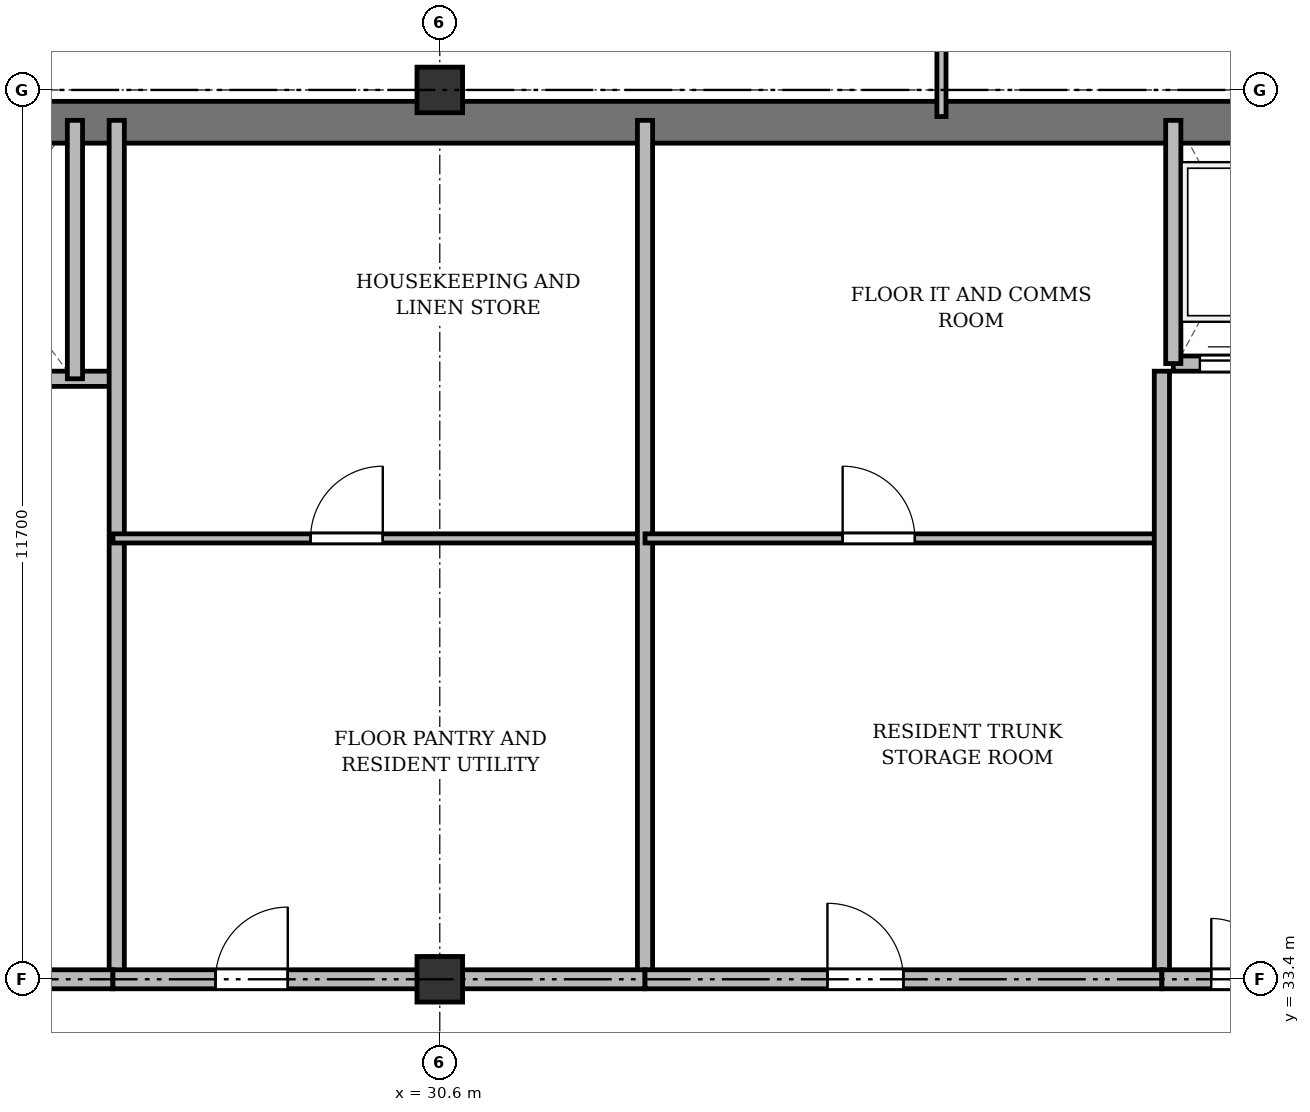
"""IFC4 building model, lengths in metres.
Left out: names, types, materials, properties, quantities, classifications, styles, units other than length and angle.
Written with IfcOpenShell. Run it as: python <this file> out.ifc"""

import sys

from ifc_helpers import new_model, si_unit, direction, frame, frame_2d, origin, origin_2d, place, context, subcontext, project, spatial, rectangle, extrude, source, transform, mapped, element, fill, save


model = new_model("IFC4")
c1 = context("Model", 3, precision=1e-05, world=origin(), true_north=direction((0.0, 1.0)))
c2 = subcontext(c1, "Body", "Model", "MODEL_VIEW")
j1 = project(units=[si_unit("LENGTHUNIT", "METRE"), si_unit("PLANEANGLEUNIT", "RADIAN")], contexts=[c1])
p1 = place(None, origin())
s1 = spatial("IfcSite", under=j1, at=p1, CompositionType="ELEMENT")
p2 = place(p1, origin())
s2 = spatial("IfcBuilding", under=s1, at=p2, CompositionType="ELEMENT")
p3 = place(p2, frame((0.0, 0.0, 277.5)))
s3 = spatial("IfcBuildingStorey", under=s2, at=p3, CompositionType="ELEMENT", Elevation=277.5)
m1 = source(origin(), c2, "Body", "SweptSolid", [
    extrude(rectangle(XDim=0.6, YDim=0.6, at=origin_2d()), origin(), (0.0, 0.0, 1.0), 3.6),
])
for number, where, z_axis, x_axis in (
    (1, (30.6, 33.4, 0.0), (0.0, 0.0, 1.0), (1.0, 0.0, 0.0)),
    (2, (30.6, 45.1, 0.0), (0.0, 0.0, 1.0), (1.0, 0.0, 0.0)),
):
    element("IfcColumn", number, at=place(p3, frame(where, z_axis=z_axis, x_axis=x_axis)), inside=s3, PredefinedType="COLUMN", context=c2, shape_type="MappedRepresentation", body=[
        mapped(m1, transform((0.0, 0.0, 0.0), x_axis=(1.0, 0.0, 0.0), y_axis=(0.0, 1.0, 0.0), z_axis=(0.0, 0.0, 1.0), scale=1.0)),
    ])
p4 = place(p3, frame((15.65, 44.675, 0.0), z_axis=(0.0, 0.0, 1.0), x_axis=(1.0, 0.0, 0.0)))
e3 = element("IfcWall", 3, at=p4, inside=s3, PredefinedType="SHEAR", context=c2, shape_type="SweptSolid", body=[
    extrude(rectangle(XDim=43.1, YDim=0.55, at=frame_2d((21.55, 0.0))), origin(), (0.0, 0.0, 1.0), 3.37),
])
p5 = place(p3, frame((19.55, 41.3, 0.0), z_axis=(0.0, 0.0, 1.0), x_axis=(1.0, 0.0, 0.0)))
e4 = element("IfcWall", 4, at=p5, inside=s3, PredefinedType="SOLIDWALL", context=c2, shape_type="SweptSolid", body=[
    extrude(rectangle(XDim=6.75, YDim=0.2, at=frame_2d((3.375, 0.0))), origin(), (0.0, 0.0, 1.0), 3.37),
])
p6 = place(p5, frame((1.7, 0.0, 0.0)))
e5 = element("IfcOpeningElement", 5, at=p6, cuts=e4, PredefinedType="OPENING", context=c2, shape_type="SweptSolid", body=[
    extrude(rectangle(XDim=1.1, YDim=2.15, at=frame_2d((0.55, 1.075))), frame((0.0, 0.11, 0.0), z_axis=(0.0, -1.0, 0.0), x_axis=(1.0, 0.0, 0.0)), (0.0, 0.0, 1.0), 0.22),
])
p7 = place(p5, frame((4.4, 0.0, 0.0)))
e6 = element("IfcOpeningElement", 6, at=p7, cuts=e4, PredefinedType="OPENING", context=c2, shape_type="SweptSolid", body=[
    extrude(rectangle(XDim=1.1, YDim=2.15, at=frame_2d((0.55, 1.075))), frame((0.0, 0.11, 0.0), z_axis=(0.0, -1.0, 0.0), x_axis=(1.0, 0.0, 0.0)), (0.0, 0.0, 1.0), 0.22),
])
p8 = place(p3, frame((25.8, 41.3, 0.0), z_axis=(0.0, 0.0, 1.0), x_axis=(0.0, 1.0, 0.0)))
e7 = element("IfcWall", 7, at=p8, inside=s3, PredefinedType="SOLIDWALL", context=c2, shape_type="SweptSolid", body=[
    extrude(rectangle(XDim=3.4, YDim=0.2, at=frame_2d((1.7, 0.0))), origin(), (0.0, 0.0, 1.0), 3.37),
])
p9 = place(p3, frame((26.35, 33.4, 0.0), z_axis=(0.0, 0.0, 1.0), x_axis=(0.0, 1.0, 0.0)))
e8 = element("IfcWall", 8, at=p9, inside=s3, PredefinedType="SOLIDWALL", context=c2, shape_type="SweptSolid", body=[
    extrude(rectangle(XDim=11.3, YDim=0.2, at=frame_2d((5.65, 0.0))), origin(), (0.0, 0.0, 1.0), 2.92),
])
p10 = place(p3, frame((19.5, 33.4, 0.0), z_axis=(0.0, 0.0, 1.0), x_axis=(1.0, 0.0, 0.0)))
e9 = element("IfcWall", 9, at=p10, inside=s3, PredefinedType="PARTITIONING", context=c2, shape_type="SweptSolid", body=[
    extrude(rectangle(XDim=6.8, YDim=0.25, at=frame_2d((3.4, 0.0))), origin(), (0.0, 0.0, 1.0), 2.92),
])
p11 = place(p10, frame((0.75, 0.0, 0.0)))
e10 = element("IfcOpeningElement", 10, at=p11, cuts=e9, PredefinedType="OPENING", context=c2, shape_type="SweptSolid", body=[
    extrude(rectangle(XDim=1.6, YDim=2.2, at=frame_2d((0.8, 1.1))), frame((0.0, 0.135, 0.0), z_axis=(0.0, -1.0, 0.0), x_axis=(1.0, 0.0, 0.0)), (0.0, 0.0, 1.0), 0.27),
])
p12 = place(p3, frame((26.3, 39.2, 0.0), z_axis=(0.0, 0.0, 1.0), x_axis=(1.0, 0.0, 0.0)))
e11 = element("IfcWall", 11, at=p12, inside=s3, PredefinedType="PARTITIONING", context=c2, shape_type="SweptSolid", body=[
    extrude(rectangle(XDim=7.0, YDim=0.12, at=frame_2d((3.5, 0.0))), origin(), (0.0, 0.0, 1.0), 2.87),
])
p13 = place(p12, frame((2.6, 0.0, 0.0)))
e12 = element("IfcOpeningElement", 12, at=p13, cuts=e11, PredefinedType="OPENING", context=c2, shape_type="SweptSolid", body=[
    extrude(rectangle(XDim=0.95, YDim=2.15, at=frame_2d((0.475, 1.075))), frame((0.0, 0.07, 0.0), z_axis=(0.0, -1.0, 0.0), x_axis=(1.0, 0.0, 0.0)), (0.0, 0.0, 1.0), 0.14),
])
p14 = place(p3, frame((33.3, 33.4, 0.0), z_axis=(0.0, 0.0, 1.0), x_axis=(0.0, 1.0, 0.0)))
e13 = element("IfcWall", 13, at=p14, inside=s3, PredefinedType="SOLIDWALL", context=c2, shape_type="SweptSolid", body=[
    extrude(rectangle(XDim=11.3, YDim=0.2, at=frame_2d((5.65, 0.0))), origin(), (0.0, 0.0, 1.0), 2.92),
])
p15 = place(p3, frame((33.3, 39.2, 0.0), z_axis=(0.0, 0.0, 1.0), x_axis=(1.0, 0.0, 0.0)))
e14 = element("IfcWall", 14, at=p15, inside=s3, PredefinedType="PARTITIONING", context=c2, shape_type="SweptSolid", body=[
    extrude(rectangle(XDim=6.8, YDim=0.12, at=frame_2d((3.4, 0.0))), origin(), (0.0, 0.0, 1.0), 3.37),
])
p16 = place(p15, frame((2.6, 0.0, 0.0)))
e15 = element("IfcOpeningElement", 15, at=p16, cuts=e14, PredefinedType="OPENING", context=c2, shape_type="SweptSolid", body=[
    extrude(rectangle(XDim=0.95, YDim=2.15, at=frame_2d((0.475, 1.075))), frame((0.0, 0.07, 0.0), z_axis=(0.0, -1.0, 0.0), x_axis=(1.0, 0.0, 0.0)), (0.0, 0.0, 1.0), 0.14),
])
p17 = place(p3, frame((40.1, 33.4, 0.0), z_axis=(0.0, 0.0, 1.0), x_axis=(0.0, 1.0, 0.0)))
e16 = element("IfcWall", 16, at=p17, inside=s3, PredefinedType="SOLIDWALL", context=c2, shape_type="SweptSolid", body=[
    extrude(rectangle(XDim=8.0, YDim=0.2, at=frame_2d((4.0, 0.0))), origin(), (0.0, 0.0, 1.0), 2.92),
])
p18 = place(p3, frame((40.25, 41.5, 0.0), z_axis=(0.0, 0.0, 1.0), x_axis=(1.0, 0.0, 0.0)))
e17 = element("IfcWall", 17, at=p18, inside=s3, PredefinedType="SOLIDWALL", context=c2, shape_type="SweptSolid", body=[
    extrude(rectangle(XDim=6.9, YDim=0.2, at=frame_2d((3.45, 0.0))), origin(), (0.0, 0.0, 1.0), 3.37),
])
p19 = place(p18, frame((0.35, 0.0, 0.0)))
e18 = element("IfcOpeningElement", 18, at=p19, cuts=e17, PredefinedType="OPENING", context=c2, shape_type="SweptSolid", body=[
    extrude(rectangle(XDim=1.05, YDim=2.15, at=frame_2d((0.525, 1.075))), frame((0.0, 0.11, 0.0), z_axis=(0.0, -1.0, 0.0), x_axis=(1.0, 0.0, 0.0)), (0.0, 0.0, 1.0), 0.22),
])
p20 = place(p18, frame((2.05, 0.0, 0.0)))
e19 = element("IfcOpeningElement", 19, at=p20, cuts=e17, PredefinedType="OPENING", context=c2, shape_type="SweptSolid", body=[
    extrude(rectangle(XDim=1.05, YDim=2.15, at=frame_2d((0.525, 1.075))), frame((0.0, 0.11, 0.0), z_axis=(0.0, -1.0, 0.0), x_axis=(1.0, 0.0, 0.0)), (0.0, 0.0, 1.0), 0.22),
])
p21 = place(p18, frame((3.75, 0.0, 0.0)))
e20 = element("IfcOpeningElement", 20, at=p21, cuts=e17, PredefinedType="OPENING", context=c2, shape_type="SweptSolid", body=[
    extrude(rectangle(XDim=1.05, YDim=2.15, at=frame_2d((0.525, 1.075))), frame((0.0, 0.11, 0.0), z_axis=(0.0, -1.0, 0.0), x_axis=(1.0, 0.0, 0.0)), (0.0, 0.0, 1.0), 0.22),
])
p22 = place(p18, frame((5.45, 0.0, 0.0)))
e21 = element("IfcOpeningElement", 21, at=p22, cuts=e17, PredefinedType="OPENING", context=c2, shape_type="SweptSolid", body=[
    extrude(rectangle(XDim=1.05, YDim=2.15, at=frame_2d((0.525, 1.075))), frame((0.0, 0.11, 0.0), z_axis=(0.0, -1.0, 0.0), x_axis=(1.0, 0.0, 0.0)), (0.0, 0.0, 1.0), 0.22),
])
p23 = place(p3, frame((40.25, 41.5, 0.0), z_axis=(0.0, 0.0, 1.0), x_axis=(0.0, 1.0, 0.0)))
e22 = element("IfcWall", 22, at=p23, inside=s3, PredefinedType="SOLIDWALL", context=c2, shape_type="SweptSolid", body=[
    extrude(rectangle(XDim=3.2, YDim=0.2, at=frame_2d((1.6, 0.0))), origin(), (0.0, 0.0, 1.0), 3.37),
])
p24 = place(p3, frame((26.3, 33.4, 0.0), z_axis=(0.0, 0.0, 1.0), x_axis=(1.0, 0.0, 0.0)))
e23 = element("IfcWall", 23, at=p24, inside=s3, PredefinedType="PARTITIONING", context=c2, shape_type="SweptSolid", body=[
    extrude(rectangle(XDim=7.0, YDim=0.25, at=frame_2d((3.5, 0.0))), origin(), (0.0, 0.0, 1.0), 2.92),
])
p25 = place(p24, frame((1.35, 0.0, 0.0)))
e24 = element("IfcOpeningElement", 24, at=p25, cuts=e23, PredefinedType="OPENING", context=c2, shape_type="SweptSolid", body=[
    extrude(rectangle(XDim=0.95, YDim=2.15, at=frame_2d((0.475, 1.075))), frame((0.0, 0.135, 0.0), z_axis=(0.0, -1.0, 0.0), x_axis=(1.0, 0.0, 0.0)), (0.0, 0.0, 1.0), 0.27),
])
p26 = place(p3, frame((33.3, 33.4, 0.0), z_axis=(0.0, 0.0, 1.0), x_axis=(1.0, 0.0, 0.0)))
e25 = element("IfcWall", 25, at=p26, inside=s3, PredefinedType="PARTITIONING", context=c2, shape_type="SweptSolid", body=[
    extrude(rectangle(XDim=6.8, YDim=0.25, at=frame_2d((3.4, 0.0))), origin(), (0.0, 0.0, 1.0), 2.92),
])
p27 = place(p26, frame((2.4, 0.0, 0.0)))
e26 = element("IfcOpeningElement", 26, at=p27, cuts=e25, PredefinedType="OPENING", context=c2, shape_type="SweptSolid", body=[
    extrude(rectangle(XDim=1.0, YDim=2.15, at=frame_2d((0.5, 1.075))), frame((0.0, 0.135, 0.0), z_axis=(0.0, -1.0, 0.0), x_axis=(1.0, 0.0, 0.0)), (0.0, 0.0, 1.0), 0.27),
])
p28 = place(p3, frame((40.1, 33.4, 0.0), z_axis=(0.0, 0.0, 1.0), x_axis=(1.0, 0.0, 0.0)))
e27 = element("IfcWall", 27, at=p28, inside=s3, PredefinedType="PARTITIONING", context=c2, shape_type="SweptSolid", body=[
    extrude(rectangle(XDim=7.05, YDim=0.25, at=frame_2d((3.525, 0.0))), origin(), (0.0, 0.0, 1.0), 2.92),
])
p29 = place(p28, frame((0.65, 0.0, 0.0)))
e28 = element("IfcOpeningElement", 28, at=p29, cuts=e27, PredefinedType="OPENING", context=c2, shape_type="SweptSolid", body=[
    extrude(rectangle(XDim=1.6, YDim=2.2, at=frame_2d((0.8, 1.1))), frame((0.0, 0.135, 0.0), z_axis=(0.0, -1.0, 0.0), x_axis=(1.0, 0.0, 0.0)), (0.0, 0.0, 1.0), 0.27),
])
p30 = place(p3, frame((37.2, 44.75, 0.0), z_axis=(0.0, 0.0, 1.0), x_axis=(0.0, 1.0, 0.0)))
e29 = element("IfcWall", 29, at=p30, inside=s3, PredefinedType="PARTITIONING", context=c2, shape_type="SweptSolid", body=[
    extrude(rectangle(XDim=3.61, YDim=0.12, at=frame_2d((1.805, 0.0))), origin(), (0.0, 0.0, 1.0), 2.92),
])
p31 = place(p30, frame((1.1, 0.0, 0.0)))
e30 = element("IfcOpeningElement", 30, at=p31, cuts=e29, PredefinedType="OPENING", context=c2, shape_type="SweptSolid", body=[
    extrude(rectangle(XDim=0.95, YDim=2.15, at=frame_2d((0.475, 1.075))), frame((0.0, 0.07, 0.0), z_axis=(0.0, -1.0, 0.0), x_axis=(1.0, 0.0, 0.0)), (0.0, 0.0, 1.0), 0.14),
])
m2 = source(origin(), c2, "Body", "SweptSolid", [
    extrude(rectangle(XDim=0.95, YDim=2.15, at=frame_2d((0.475, 1.075))), frame((0.0, 0.025, 0.0), z_axis=(0.0, -1.0, 0.0), x_axis=(1.0, 0.0, 0.0)), (0.0, 0.0, 1.0), 0.05),
])
p32 = place(p13, origin())
e31 = element("IfcDoor", 31, at=p32, inside=s3, OperationType="SINGLE_SWING_RIGHT", PredefinedType="DOOR", context=c2, shape_type="MappedRepresentation", body=[
    mapped(m2, transform((0.0, 0.0, 0.0), x_axis=(1.0, 0.0, 0.0), y_axis=(0.0, 1.0, 0.0), z_axis=(0.0, 0.0, 1.0), scale=1.0)),
])
fill(e12, e31)
p33 = place(p16, origin())
e32 = element("IfcDoor", 32, at=p33, inside=s3, OperationType="SINGLE_SWING_LEFT", PredefinedType="DOOR", context=c2, shape_type="MappedRepresentation", body=[
    mapped(m2, transform((0.0, 0.0, 0.0), x_axis=(1.0, 0.0, 0.0), y_axis=(0.0, 1.0, 0.0), z_axis=(0.0, 0.0, 1.0), scale=1.0)),
])
fill(e15, e32)
m3 = source(origin(), c2, "Body", "SweptSolid", [
    extrude(rectangle(XDim=1.05, YDim=2.15, at=frame_2d((0.525, 1.075))), frame((0.0, 0.025, 0.0), z_axis=(0.0, -1.0, 0.0), x_axis=(1.0, 0.0, 0.0)), (0.0, 0.0, 1.0), 0.05),
])
p34 = place(p19, origin())
e33 = element("IfcDoor", 33, at=p34, inside=s3, OperationType="DOUBLE_DOOR_SLIDING", PredefinedType="DOOR", context=c2, shape_type="MappedRepresentation", body=[
    mapped(m3, transform((0.0, 0.0, 0.0), x_axis=(1.0, 0.0, 0.0), y_axis=(0.0, 1.0, 0.0), z_axis=(0.0, 0.0, 1.0), scale=1.0)),
])
fill(e18, e33)
p35 = place(p25, origin())
e34 = element("IfcDoor", 34, at=p35, inside=s3, OperationType="SINGLE_SWING_RIGHT", PredefinedType="DOOR", context=c2, shape_type="MappedRepresentation", body=[
    mapped(m2, transform((0.0, 0.0, 0.0), x_axis=(1.0, 0.0, 0.0), y_axis=(0.0, 1.0, 0.0), z_axis=(0.0, 0.0, 1.0), scale=1.0)),
])
fill(e24, e34)
m4 = source(origin(), c2, "Body", "SweptSolid", [
    extrude(rectangle(XDim=1.0, YDim=2.15, at=frame_2d((0.5, 1.075))), frame((0.0, 0.025, 0.0), z_axis=(0.0, -1.0, 0.0), x_axis=(1.0, 0.0, 0.0)), (0.0, 0.0, 1.0), 0.05),
])
p36 = place(p27, origin())
e35 = element("IfcDoor", 35, at=p36, inside=s3, OperationType="SINGLE_SWING_LEFT", PredefinedType="DOOR", context=c2, shape_type="MappedRepresentation", body=[
    mapped(m4, transform((0.0, 0.0, 0.0), x_axis=(1.0, 0.0, 0.0), y_axis=(0.0, 1.0, 0.0), z_axis=(0.0, 0.0, 1.0), scale=1.0)),
])
fill(e26, e35)
m5 = source(origin(), c2, "Body", "SweptSolid", [
    extrude(rectangle(XDim=1.6, YDim=2.2, at=frame_2d((0.8, 1.1))), frame((0.0, 0.025, 0.0), z_axis=(0.0, -1.0, 0.0), x_axis=(1.0, 0.0, 0.0)), (0.0, 0.0, 1.0), 0.05),
])
p37 = place(p29, origin())
e36 = element("IfcDoor", 36, at=p37, inside=s3, OperationType="DOUBLE_DOOR_SINGLE_SWING", PredefinedType="DOOR", context=c2, shape_type="MappedRepresentation", body=[
    mapped(m5, transform((0.0, 0.0, 0.0), x_axis=(1.0, 0.0, 0.0), y_axis=(0.0, 1.0, 0.0), z_axis=(0.0, 0.0, 1.0), scale=1.0)),
])
fill(e28, e36)
save(model, sys.argv[1])
